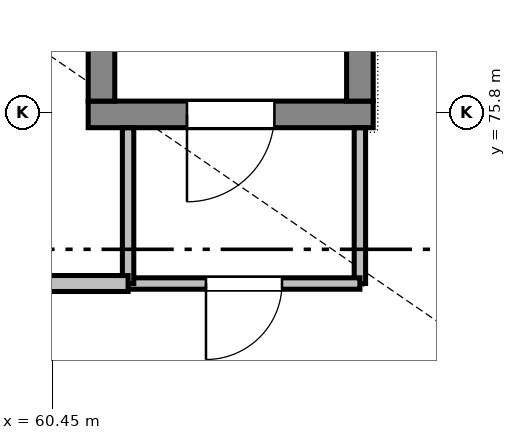
"""IFC4 building model, lengths in metres.
Left out: names, types, materials, properties, quantities, classifications, styles, units other than length and angle.
Written with IfcOpenShell. Run it as: python <this file> out.ifc"""

import sys

from ifc_helpers import new_model, si_unit, direction, frame, frame_2d, origin, place, context, subcontext, project, spatial, rectangle, extrude, element, fill, save


model = new_model("IFC4")
c1 = context("Model", 3, precision=1e-05, world=origin(), true_north=direction((0.0, 1.0)))
c2 = subcontext(c1, "Body", "Model", "MODEL_VIEW")
j1 = project(units=[si_unit("LENGTHUNIT", "METRE"), si_unit("PLANEANGLEUNIT", "RADIAN")], contexts=[c1])
p1 = place(None, origin())
s1 = spatial("IfcSite", under=j1, at=p1, CompositionType="ELEMENT")
p2 = place(p1, origin())
s2 = spatial("IfcBuilding", under=s1, at=p2, CompositionType="ELEMENT")
p3 = place(p2, origin())
s3 = spatial("IfcBuildingStorey", under=s2, at=p3, CompositionType="ELEMENT", Elevation=0.0)
p4 = place(p3, frame((64.675, 75.775, -0.32), z_axis=(0.0, 0.0, 1.0), x_axis=(-1.0, 0.0, 0.0)))
e1 = element("IfcWall", 1, at=p4, inside=s3, PredefinedType="SHEAR", context=c2, shape_type="SweptSolid", body=[
    extrude(rectangle(XDim=3.75, YDim=0.35, at=frame_2d((1.875, 0.0))), origin(), (0.0, 0.0, 1.0), 5.72),
])
p5 = place(p4, frame((1.3, 0.0, 0.32)))
e2 = element("IfcOpeningElement", 2, at=p5, cuts=e1, PredefinedType="OPENING", context=c2, shape_type="SweptSolid", body=[
    extrude(rectangle(XDim=1.15, YDim=2.15, at=frame_2d((0.575, 1.075))), frame((0.0, 0.185, 0.0), z_axis=(0.0, -1.0, 0.0), x_axis=(1.0, 0.0, 0.0)), (0.0, 0.0, 1.0), 0.37),
])
for number, where, z_axis, x_axis in (
    (3, (61.1, 75.95, -0.32), (0.0, 0.0, 1.0), (0.0, 1.0, 0.0)),
    (4, (64.5, 75.95, -0.32), (0.0, 0.0, 1.0), (0.0, 1.0, 0.0)),
):
    element("IfcWall", number, at=place(p3, frame(where, z_axis=z_axis, x_axis=x_axis)), inside=s3, PredefinedType="SHEAR", context=c2, shape_type="SweptSolid", body=[
        extrude(rectangle(XDim=7.275, YDim=0.35, at=frame_2d((3.638, 0.0))), origin(), (0.0, 0.0, 1.0), 5.72),
    ])
p6 = place(p3, frame((64.5, 75.598, 0.0), z_axis=(0.0, 0.0, 1.0), x_axis=(0.0, -1.0, 0.0)))
e5 = element("IfcWall", 5, at=p6, inside=s3, PredefinedType="PARTITIONING", context=c2, shape_type="SweptSolid", body=[
    extrude(rectangle(XDim=2.048, YDim=0.15, at=frame_2d((1.024, 0.0))), origin(), (0.0, 0.0, 1.0), 4.735),
])
p7 = place(p3, frame((64.5, 73.55, 0.0), z_axis=(0.0, 0.0, 1.0), x_axis=(-1.0, 0.0, 0.0)))
e6 = element("IfcWall", 6, at=p7, inside=s3, PredefinedType="PARTITIONING", context=c2, shape_type="SweptSolid", body=[
    extrude(rectangle(XDim=3.05, YDim=0.15, at=frame_2d((1.525, 0.0))), origin(), (0.0, 0.0, 1.0), 4.885),
])
p8 = place(p7, frame((1.025, 0.0, 0.0)))
e7 = element("IfcOpeningElement", 7, at=p8, cuts=e6, PredefinedType="OPENING", context=c2, shape_type="SweptSolid", body=[
    extrude(rectangle(XDim=1.0, YDim=2.1, at=frame_2d((0.5, 1.05))), frame((0.0, 0.085, 0.0), z_axis=(0.0, -1.0, 0.0), x_axis=(1.0, 0.0, 0.0)), (0.0, 0.0, 1.0), 0.17),
])
p9 = place(p3, frame((61.45, 73.55, 0.0), z_axis=(0.0, 0.0, 1.0), x_axis=(0.0, 1.0, 0.0)))
e8 = element("IfcWall", 8, at=p9, inside=s3, PredefinedType="PARTITIONING", context=c2, shape_type="SweptSolid", body=[
    extrude(rectangle(XDim=2.048, YDim=0.15, at=frame_2d((1.024, 0.0))), origin(), (0.0, 0.0, 1.0), 4.735),
])
p10 = place(p3, frame((61.45, 73.55, 0.0), z_axis=(0.0, 0.0, 1.0), x_axis=(-1.0, 0.0, 0.0)))
e9 = element("IfcWall", 9, at=p10, inside=s3, PredefinedType="PARTITIONING", context=c2, shape_type="SweptSolid", body=[
    extrude(rectangle(XDim=1.85, YDim=0.21, at=frame_2d((0.925, 0.0))), origin(), (0.0, 0.0, 1.0), 4.535),
])
p11 = place(p5, origin())
e10 = element("IfcDoor", 10, at=p11, inside=s3, OperationType="SINGLE_SWING_RIGHT", PredefinedType="DOOR", context=c2, shape_type="SweptSolid", body=[
    extrude(rectangle(XDim=1.15, YDim=2.15, at=frame_2d((0.575, 1.075))), frame((0.0, 0.025, 0.0), z_axis=(0.0, -1.0, 0.0), x_axis=(1.0, 0.0, 0.0)), (0.0, 0.0, 1.0), 0.05),
])
fill(e2, e10)
p12 = place(p8, origin())
e11 = element("IfcDoor", 11, at=p12, inside=s3, OperationType="SINGLE_SWING_RIGHT", PredefinedType="DOOR", context=c2, shape_type="SweptSolid", body=[
    extrude(rectangle(XDim=1.0, YDim=2.1, at=frame_2d((0.5, 1.05))), frame((0.0, 0.025, 0.0), z_axis=(0.0, -1.0, 0.0), x_axis=(1.0, 0.0, 0.0)), (0.0, 0.0, 1.0), 0.05),
])
fill(e7, e11)
save(model, sys.argv[1])
